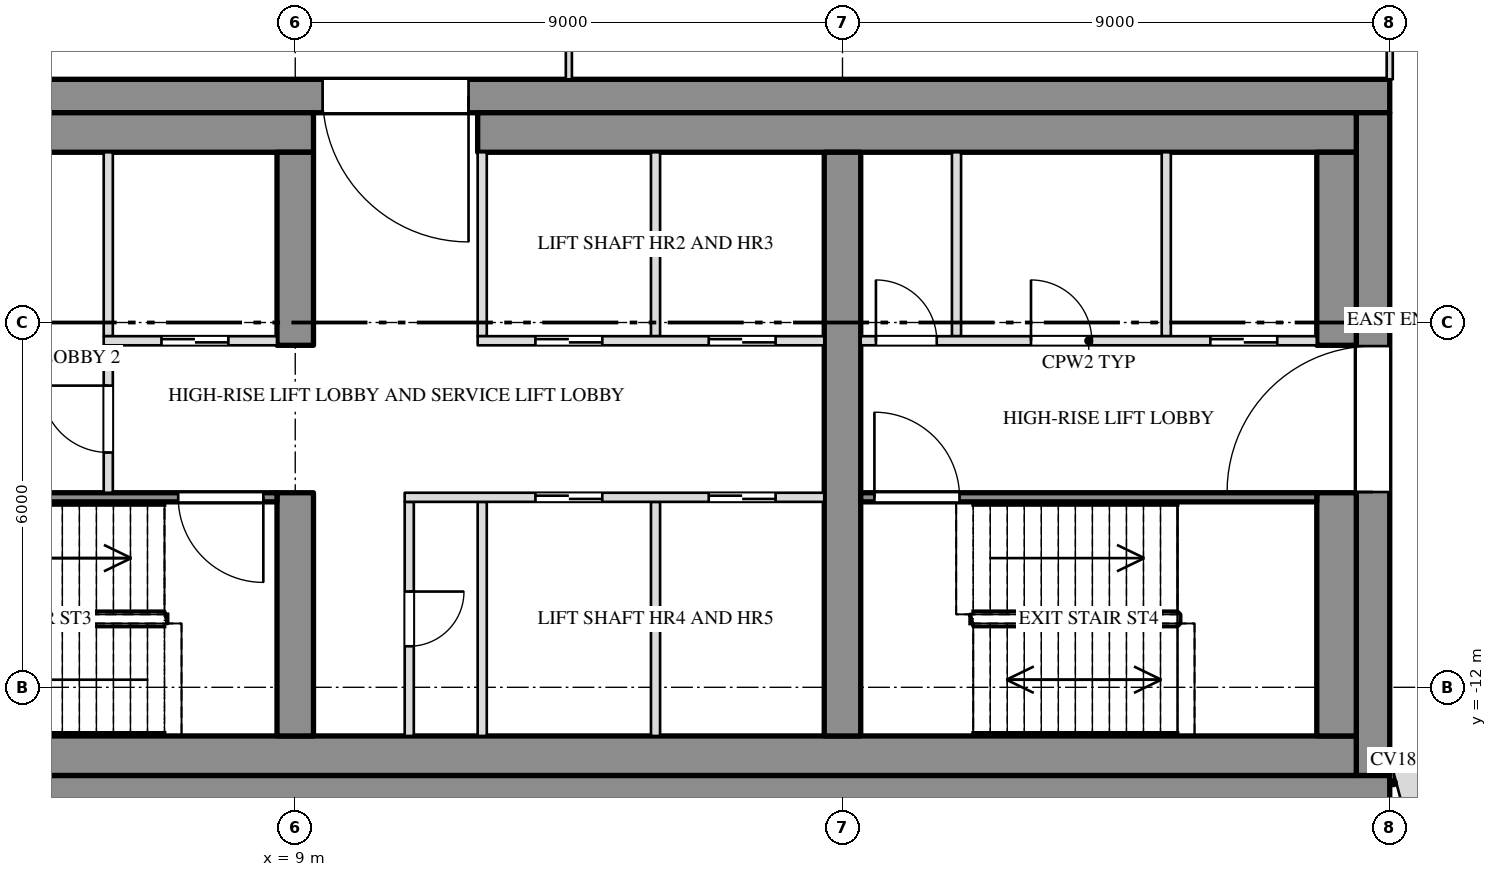
"""IFC4 building model, lengths in metres.
Left out: names, types, materials, properties, quantities, classifications, styles, units other than length and angle.
Written with IfcOpenShell. Run it as: python <this file> out.ifc"""

import sys

from ifc_helpers import new_model, si_unit, direction, frame, frame_2d, origin, place, context, subcontext, project, spatial, rectangle, extrude, element, fill, save


model = new_model("IFC4")
c1 = context("Model", 3, precision=1e-05, world=origin(), true_north=direction((0.0, 1.0)))
c2 = subcontext(c1, "Body", "Model", "MODEL_VIEW")
j1 = project(units=[si_unit("LENGTHUNIT", "METRE"), si_unit("PLANEANGLEUNIT", "RADIAN")], contexts=[c1])
p1 = place(None, origin())
s1 = spatial("IfcSite", under=j1, at=p1, CompositionType="ELEMENT")
p2 = place(p1, origin())
s2 = spatial("IfcBuilding", under=s1, at=p2, CompositionType="ELEMENT")
p3 = place(p2, frame((0.0, 0.0, 292.5)))
s3 = spatial("IfcBuildingStorey", under=s2, at=p3, CompositionType="ELEMENT", Elevation=292.5)
p4 = place(p3, frame((-27.0, -2.275, 0.0), z_axis=(0.0, 0.0, 1.0), x_axis=(1.0, 0.0, 0.0)))
e1 = element("IfcWall", 1, at=p4, inside=s3, PredefinedType="SHEAR", context=c2, shape_type="SweptSolid", body=[
    extrude(rectangle(XDim=54.0, YDim=0.55, at=frame_2d((27.0, 0.0))), origin(), (0.0, 0.0, 1.0), 3.6),
])
p5 = place(p4, frame((15.15, 0.0, 0.0)))
e2 = element("IfcOpeningElement", 2, at=p5, cuts=e1, PredefinedType="OPENING", context=c2, shape_type="SweptSolid", body=[
    extrude(rectangle(XDim=2.4, YDim=2.1, at=frame_2d((1.2, 1.05))), frame((0.0, 0.287, 0.0), z_axis=(0.0, -1.0, 0.0), x_axis=(1.0, 0.0, 0.0)), (0.0, 0.0, 1.0), 0.574),
])
p6 = place(p4, frame((36.45, 0.0, 0.0)))
e3 = element("IfcOpeningElement", 3, at=p6, cuts=e1, PredefinedType="OPENING", context=c2, shape_type="SweptSolid", body=[
    extrude(rectangle(XDim=2.4, YDim=2.1, at=frame_2d((1.2, 1.05))), frame((0.0, 0.287, 0.0), z_axis=(0.0, -1.0, 0.0), x_axis=(1.0, 0.0, 0.0)), (0.0, 0.0, 1.0), 0.574),
])
p7 = place(p3, frame((-27.0, -13.725, 0.0), z_axis=(0.0, 0.0, 1.0), x_axis=(1.0, 0.0, 0.0)))
e4 = element("IfcWall", 4, at=p7, inside=s3, PredefinedType="SHEAR", context=c2, shape_type="SweptSolid", body=[
    extrude(rectangle(XDim=54.0, YDim=0.55, at=frame_2d((27.0, 0.0))), origin(), (0.0, 0.0, 1.0), 3.6),
])
p8 = place(p3, frame((26.725, -13.45, 0.0), z_axis=(0.0, 0.0, 1.0), x_axis=(0.0, 1.0, 0.0)))
e5 = element("IfcWall", 5, at=p8, inside=s3, PredefinedType="SHEAR", context=c2, shape_type="SweptSolid", body=[
    extrude(rectangle(XDim=10.9, YDim=0.55, at=frame_2d((5.45, 0.0))), origin(), (0.0, 0.0, 1.0), 3.6),
])
p9 = place(p8, frame((4.662, 0.0, 0.0)))
e6 = element("IfcOpeningElement", 6, at=p9, cuts=e5, PredefinedType="OPENING", context=c2, shape_type="SweptSolid", body=[
    extrude(rectangle(XDim=2.4, YDim=2.1, at=frame_2d((1.2, 1.05))), frame((0.0, 0.287, 0.0), z_axis=(0.0, -1.0, 0.0), x_axis=(1.0, 0.0, 0.0)), (0.0, 0.0, 1.0), 0.574),
])
p10 = place(p3, frame((-9.3, -2.875, 0.0), z_axis=(0.0, 0.0, 1.0), x_axis=(1.0, 0.0, 0.0)))
e7 = element("IfcWall", 7, at=p10, inside=s3, PredefinedType="SHEAR", context=c2, shape_type="SweptSolid", body=[
    extrude(rectangle(XDim=18.6, YDim=0.65, at=frame_2d((9.3, 0.0))), origin(), (0.0, 0.0, 1.0), 3.6),
])
p11 = place(p3, frame((12.0, -2.875, 0.0), z_axis=(0.0, 0.0, 1.0), x_axis=(1.0, 0.0, 0.0)))
e8 = element("IfcWall", 8, at=p11, inside=s3, PredefinedType="SHEAR", context=c2, shape_type="SweptSolid", body=[
    extrude(rectangle(XDim=14.45, YDim=0.65, at=frame_2d((7.225, 0.0))), origin(), (0.0, 0.0, 1.0), 3.6),
])
p12 = place(p3, frame((-26.45, -13.125, 0.0), z_axis=(0.0, 0.0, 1.0), x_axis=(1.0, 0.0, 0.0)))
e9 = element("IfcWall", 9, at=p12, inside=s3, PredefinedType="SHEAR", context=c2, shape_type="SweptSolid", body=[
    extrude(rectangle(XDim=52.9, YDim=0.65, at=frame_2d((26.45, 0.0))), origin(), (0.0, 0.0, 1.0), 3.6),
])
p13 = place(p3, frame((26.125, -12.8, 0.0), z_axis=(0.0, 0.0, 1.0), x_axis=(0.0, 1.0, 0.0)))
e10 = element("IfcWall", 10, at=p13, inside=s3, PredefinedType="SHEAR", context=c2, shape_type="SweptSolid", body=[
    extrude(rectangle(XDim=4.0, YDim=0.65, at=frame_2d((2.0, 0.0))), origin(), (0.0, 0.0, 1.0), 3.6),
])
p14 = place(p3, frame((26.125, -6.375, 0.0), z_axis=(0.0, 0.0, 1.0), x_axis=(0.0, 1.0, 0.0)))
e11 = element("IfcWall", 11, at=p14, inside=s3, PredefinedType="SHEAR", context=c2, shape_type="SweptSolid", body=[
    extrude(rectangle(XDim=3.175, YDim=0.65, at=frame_2d((1.587, 0.0))), origin(), (0.0, 0.0, 1.0), 3.6),
])
p15 = place(p3, frame((9.0, -12.8, 0.0), z_axis=(0.0, 0.0, 1.0), x_axis=(0.0, 1.0, 0.0)))
e12 = element("IfcWall", 12, at=p15, inside=s3, PredefinedType="SHEAR", context=c2, shape_type="SweptSolid", body=[
    extrude(rectangle(XDim=4.0, YDim=0.6, at=frame_2d((2.0, 0.0))), origin(), (0.0, 0.0, 1.0), 3.6),
])
p16 = place(p3, frame((9.0, -6.375, 0.0), z_axis=(0.0, 0.0, 1.0), x_axis=(0.0, 1.0, 0.0)))
e13 = element("IfcWall", 13, at=p16, inside=s3, PredefinedType="SHEAR", context=c2, shape_type="SweptSolid", body=[
    extrude(rectangle(XDim=3.175, YDim=0.6, at=frame_2d((1.587, 0.0))), origin(), (0.0, 0.0, 1.0), 3.6),
])
p17 = place(p3, frame((18.0, -12.8, 0.0), z_axis=(0.0, 0.0, 1.0), x_axis=(0.0, 1.0, 0.0)))
e14 = element("IfcWall", 14, at=p17, inside=s3, PredefinedType="SHEAR", context=c2, shape_type="SweptSolid", body=[
    extrude(rectangle(XDim=9.6, YDim=0.6, at=frame_2d((4.8, 0.0))), origin(), (0.0, 0.0, 1.0), 3.6),
])
p18 = place(p3, frame((13.5, -2.0, 0.0), z_axis=(0.0, 0.0, 1.0), x_axis=(0.0, 1.0, 0.0)))
e15 = element("IfcWall", 15, at=p18, inside=s3, PredefinedType="PARTITIONING", context=c2, shape_type="SweptSolid", body=[
    extrude(rectangle(XDim=9.63, YDim=0.1, at=frame_2d((4.815, 0.0))), origin(), (0.0, 0.0, 1.0), 2.988),
])
p19 = place(p3, frame((27.0, -2.0, 0.0), z_axis=(0.0, 0.0, 1.0), x_axis=(0.0, 1.0, 0.0)))
e16 = element("IfcWall", 16, at=p19, inside=s3, PredefinedType="PARTITIONING", context=c2, shape_type="SweptSolid", body=[
    extrude(rectangle(XDim=6.323, YDim=0.1, at=frame_2d((3.162, 0.0))), origin(), (0.0, 0.0, 1.0), 2.668),
])
p20 = place(p3, frame((27.104, -13.558, 0.0), z_axis=(0.0, 0.0, 1.0), x_axis=(0.965913121497, 0.258866455379, 0.0)))
e17 = element("IfcWall", 17, at=p20, inside=s3, PredefinedType="SOLIDWALL", context=c2, shape_type="SweptSolid", body=[
    extrude(rectangle(XDim=1.123, YDim=0.8, at=frame_2d((0.562, 0.0))), origin(), (0.0, 0.0, 1.0), 3.6),
])
for number, where, z_axis, x_axis in (
    (18, (5.925, -6.225, 0.0), (0.0, 0.0, 1.0), (0.0, 1.0, 0.0)),
    (19, (12.075, -6.225, 0.0), (0.0, 0.0, 1.0), (0.0, 1.0, 0.0)),
    (20, (14.925, -6.225, 0.0), (0.0, 0.0, 1.0), (0.0, 1.0, 0.0)),
    (21, (19.875, -6.225, 0.0), (0.0, 0.0, 1.0), (0.0, 1.0, 0.0)),
    (22, (23.325, -6.225, 0.0), (0.0, 0.0, 1.0), (0.0, 1.0, 0.0)),
):
    element("IfcWall", number, at=place(p3, frame(where, z_axis=z_axis, x_axis=x_axis)), inside=s3, PredefinedType="PARTITIONING", context=c2, shape_type="SweptSolid", body=[
        extrude(rectangle(XDim=3.025, YDim=0.15, at=frame_2d((1.513, 0.0))), origin(), (0.0, 0.0, 1.0), 3.6),
    ])
p21 = place(p3, frame((10.875, -12.8, 0.0), z_axis=(0.0, 0.0, 1.0), x_axis=(0.0, 1.0, 0.0)))
e23 = element("IfcWall", 23, at=p21, inside=s3, PredefinedType="PARTITIONING", context=c2, shape_type="SweptSolid", body=[
    extrude(rectangle(XDim=3.85, YDim=0.15, at=frame_2d((1.925, 0.0))), origin(), (0.0, 0.0, 1.0), 3.6),
])
p22 = place(p21, frame((1.475, 0.0, 0.0)))
e24 = element("IfcOpeningElement", 24, at=p22, cuts=e23, PredefinedType="OPENING", context=c2, shape_type="SweptSolid", body=[
    extrude(rectangle(XDim=0.9, YDim=2.1, at=frame_2d((0.45, 1.05))), frame((0.0, 0.087, 0.0), z_axis=(0.0, -1.0, 0.0), x_axis=(1.0, 0.0, 0.0)), (0.0, 0.0, 1.0), 0.174),
])
for number, where, z_axis, x_axis in (
    (25, (12.075, -12.8, 0.0), (0.0, 0.0, 1.0), (0.0, 1.0, 0.0)),
    (26, (14.925, -12.8, 0.0), (0.0, 0.0, 1.0), (0.0, 1.0, 0.0)),
):
    element("IfcWall", number, at=place(p3, frame(where, z_axis=z_axis, x_axis=x_axis)), inside=s3, PredefinedType="PARTITIONING", context=c2, shape_type="SweptSolid", body=[
        extrude(rectangle(XDim=3.85, YDim=0.15, at=frame_2d((1.925, 0.0))), origin(), (0.0, 0.0, 1.0), 3.6),
    ])
p23 = place(p3, frame((5.925, -8.8, 0.0), z_axis=(0.0, 0.0, 1.0), x_axis=(0.0, 1.0, 0.0)))
e27 = element("IfcWall", 27, at=p23, inside=s3, PredefinedType="PARTITIONING", context=c2, shape_type="SweptSolid", body=[
    extrude(rectangle(XDim=2.425, YDim=0.15, at=frame_2d((1.212, 0.0))), origin(), (0.0, 0.0, 1.0), 3.6),
])
p24 = place(p23, frame((0.662, 0.0, 0.0)))
e28 = element("IfcOpeningElement", 28, at=p24, cuts=e27, PredefinedType="OPENING", context=c2, shape_type="SweptSolid", body=[
    extrude(rectangle(XDim=1.1, YDim=2.1, at=frame_2d((0.55, 1.05))), frame((0.0, 0.087, 0.0), z_axis=(0.0, -1.0, 0.0), x_axis=(1.0, 0.0, 0.0)), (0.0, 0.0, 1.0), 0.174),
])
p25 = place(p3, frame((5.85, -6.3, 0.0), z_axis=(0.0, 0.0, 1.0), x_axis=(1.0, 0.0, 0.0)))
e29 = element("IfcWall", 29, at=p25, inside=s3, PredefinedType="PARTITIONING", context=c2, shape_type="SweptSolid", body=[
    extrude(rectangle(XDim=2.85, YDim=0.15, at=frame_2d((1.425, 0.0))), origin(), (0.0, 0.0, 1.0), 3.6),
])
p26 = place(p25, frame((0.95, 0.0, 0.0)))
e30 = element("IfcOpeningElement", 30, at=p26, cuts=e29, PredefinedType="OPENING", context=c2, shape_type="SweptSolid", body=[
    extrude(rectangle(XDim=1.1, YDim=2.1, at=frame_2d((0.55, 1.05))), frame((0.0, 0.087, 0.0), z_axis=(0.0, -1.0, 0.0), x_axis=(1.0, 0.0, 0.0)), (0.0, 0.0, 1.0), 0.174),
])
p27 = place(p3, frame((12.0, -6.3, 0.0), z_axis=(0.0, 0.0, 1.0), x_axis=(1.0, 0.0, 0.0)))
e31 = element("IfcWall", 31, at=p27, inside=s3, PredefinedType="PARTITIONING", context=c2, shape_type="SweptSolid", body=[
    extrude(rectangle(XDim=5.7, YDim=0.15, at=frame_2d((2.85, 0.0))), origin(), (0.0, 0.0, 1.0), 3.6),
])
p28 = place(p27, frame((0.95, 0.0, 0.0)))
e32 = element("IfcOpeningElement", 32, at=p28, cuts=e31, PredefinedType="OPENING", context=c2, shape_type="SweptSolid", body=[
    extrude(rectangle(XDim=1.1, YDim=2.1, at=frame_2d((0.55, 1.05))), frame((0.0, 0.087, 0.0), z_axis=(0.0, -1.0, 0.0), x_axis=(1.0, 0.0, 0.0)), (0.0, 0.0, 1.0), 0.174),
])
p29 = place(p27, frame((3.8, 0.0, 0.0)))
e33 = element("IfcOpeningElement", 33, at=p29, cuts=e31, PredefinedType="OPENING", context=c2, shape_type="SweptSolid", body=[
    extrude(rectangle(XDim=1.1, YDim=2.1, at=frame_2d((0.55, 1.05))), frame((0.0, 0.087, 0.0), z_axis=(0.0, -1.0, 0.0), x_axis=(1.0, 0.0, 0.0)), (0.0, 0.0, 1.0), 0.174),
])
p30 = place(p3, frame((18.3, -6.3, 0.0), z_axis=(0.0, 0.0, 1.0), x_axis=(1.0, 0.0, 0.0)))
e34 = element("IfcWall", 34, at=p30, inside=s3, PredefinedType="PARTITIONING", context=c2, shape_type="SweptSolid", body=[
    extrude(rectangle(XDim=7.5, YDim=0.15, at=frame_2d((3.75, 0.0))), origin(), (0.0, 0.0, 1.0), 3.6),
])
p31 = place(p30, frame((0.25, 0.0, 0.0)))
e35 = element("IfcOpeningElement", 35, at=p31, cuts=e34, PredefinedType="OPENING", context=c2, shape_type="SweptSolid", body=[
    extrude(rectangle(XDim=1.0, YDim=2.1, at=frame_2d((0.5, 1.05))), frame((0.0, 0.087, 0.0), z_axis=(0.0, -1.0, 0.0), x_axis=(1.0, 0.0, 0.0)), (0.0, 0.0, 1.0), 0.174),
])
p32 = place(p30, frame((2.8, 0.0, 0.0)))
e36 = element("IfcOpeningElement", 36, at=p32, cuts=e34, PredefinedType="OPENING", context=c2, shape_type="SweptSolid", body=[
    extrude(rectangle(XDim=1.0, YDim=2.1, at=frame_2d((0.5, 1.05))), frame((0.0, 0.087, 0.0), z_axis=(0.0, -1.0, 0.0), x_axis=(1.0, 0.0, 0.0)), (0.0, 0.0, 1.0), 0.174),
])
p33 = place(p30, frame((5.75, 0.0, 0.0)))
e37 = element("IfcOpeningElement", 37, at=p33, cuts=e34, PredefinedType="OPENING", context=c2, shape_type="SweptSolid", body=[
    extrude(rectangle(XDim=1.1, YDim=2.1, at=frame_2d((0.55, 1.05))), frame((0.0, 0.087, 0.0), z_axis=(0.0, -1.0, 0.0), x_axis=(1.0, 0.0, 0.0)), (0.0, 0.0, 1.0), 0.174),
])
p34 = place(p3, frame((0.3, -8.875, 0.0), z_axis=(0.0, 0.0, 1.0), x_axis=(1.0, 0.0, 0.0)))
e38 = element("IfcWall", 38, at=p34, inside=s3, PredefinedType="SHEAR", context=c2, shape_type="SweptSolid", body=[
    extrude(rectangle(XDim=8.4, YDim=0.15, at=frame_2d((4.2, 0.0))), origin(), (0.0, 0.0, 1.0), 3.6),
])
p35 = place(p34, frame((6.775, 0.0, 0.0)))
e39 = element("IfcOpeningElement", 39, at=p35, cuts=e38, PredefinedType="OPENING", context=c2, shape_type="SweptSolid", body=[
    extrude(rectangle(XDim=1.4, YDim=2.1, at=frame_2d((0.7, 1.05))), frame((0.0, 0.087, 0.0), z_axis=(0.0, -1.0, 0.0), x_axis=(1.0, 0.0, 0.0)), (0.0, 0.0, 1.0), 0.174),
])
p36 = place(p3, frame((10.8, -8.875, 0.0), z_axis=(0.0, 0.0, 1.0), x_axis=(1.0, 0.0, 0.0)))
e40 = element("IfcWall", 40, at=p36, inside=s3, PredefinedType="PARTITIONING", context=c2, shape_type="SweptSolid", body=[
    extrude(rectangle(XDim=6.9, YDim=0.15, at=frame_2d((3.45, 0.0))), origin(), (0.0, 0.0, 1.0), 3.6),
])
p37 = place(p36, frame((2.15, 0.0, 0.0)))
e41 = element("IfcOpeningElement", 41, at=p37, cuts=e40, PredefinedType="OPENING", context=c2, shape_type="SweptSolid", body=[
    extrude(rectangle(XDim=1.1, YDim=2.1, at=frame_2d((0.55, 1.05))), frame((0.0, 0.087, 0.0), z_axis=(0.0, -1.0, 0.0), x_axis=(1.0, 0.0, 0.0)), (0.0, 0.0, 1.0), 0.174),
])
p38 = place(p36, frame((5.0, 0.0, 0.0)))
e42 = element("IfcOpeningElement", 42, at=p38, cuts=e40, PredefinedType="OPENING", context=c2, shape_type="SweptSolid", body=[
    extrude(rectangle(XDim=1.1, YDim=2.1, at=frame_2d((0.55, 1.05))), frame((0.0, 0.087, 0.0), z_axis=(0.0, -1.0, 0.0), x_axis=(1.0, 0.0, 0.0)), (0.0, 0.0, 1.0), 0.174),
])
p39 = place(p3, frame((18.3, -8.875, 0.0), z_axis=(0.0, 0.0, 1.0), x_axis=(1.0, 0.0, 0.0)))
e43 = element("IfcWall", 43, at=p39, inside=s3, PredefinedType="SHEAR", context=c2, shape_type="SweptSolid", body=[
    extrude(rectangle(XDim=7.5, YDim=0.15, at=frame_2d((3.75, 0.0))), origin(), (0.0, 0.0, 1.0), 3.6),
])
p40 = place(p39, frame((0.225, 0.0, 0.0)))
e44 = element("IfcOpeningElement", 44, at=p40, cuts=e43, PredefinedType="OPENING", context=c2, shape_type="SweptSolid", body=[
    extrude(rectangle(XDim=1.4, YDim=2.1, at=frame_2d((0.7, 1.05))), frame((0.0, 0.087, 0.0), z_axis=(0.0, -1.0, 0.0), x_axis=(1.0, 0.0, 0.0)), (0.0, 0.0, 1.0), 0.174),
])
p41 = place(p24, origin())
e45 = element("IfcDoor", 45, at=p41, inside=s3, OperationType="SINGLE_SWING_RIGHT", PredefinedType="DOOR", context=c2, shape_type="SweptSolid", body=[
    extrude(rectangle(XDim=1.1, YDim=2.1, at=frame_2d((0.55, 1.05))), frame((0.0, 0.025, 0.0), z_axis=(0.0, -1.0, 0.0), x_axis=(1.0, 0.0, 0.0)), (0.0, 0.0, 1.0), 0.05),
])
fill(e28, e45)
p42 = place(p26, origin())
e46 = element("IfcDoor", 46, at=p42, inside=s3, OperationType="SLIDING_TO_RIGHT", PredefinedType="DOOR", context=c2, shape_type="SweptSolid", body=[
    extrude(rectangle(XDim=1.1, YDim=2.1, at=frame_2d((0.55, 1.05))), frame((0.0, 0.025, 0.0), z_axis=(0.0, -1.0, 0.0), x_axis=(1.0, 0.0, 0.0)), (0.0, 0.0, 1.0), 0.05),
])
fill(e30, e46)
p43 = place(p35, origin())
e47 = element("IfcDoor", 47, at=p43, inside=s3, OperationType="DOUBLE_DOOR_SINGLE_SWING", PredefinedType="DOOR", context=c2, shape_type="SweptSolid", body=[
    extrude(rectangle(XDim=1.4, YDim=2.1, at=frame_2d((0.7, 1.05))), frame((0.0, 0.025, 0.0), z_axis=(0.0, -1.0, 0.0), x_axis=(1.0, 0.0, 0.0)), (0.0, 0.0, 1.0), 0.05),
])
fill(e39, e47)
p44 = place(p6, origin())
e48 = element("IfcDoor", 48, at=p44, inside=s3, OperationType="DOUBLE_DOOR_SINGLE_SWING", PredefinedType="DOOR", context=c2, shape_type="SweptSolid", body=[
    extrude(rectangle(XDim=2.4, YDim=2.1, at=frame_2d((1.2, 1.05))), frame((0.0, 0.025, 0.0), z_axis=(0.0, -1.0, 0.0), x_axis=(1.0, 0.0, 0.0)), (0.0, 0.0, 1.0), 0.05),
])
fill(e3, e48)
p45 = place(p22, origin())
e49 = element("IfcDoor", 49, at=p45, inside=s3, OperationType="SINGLE_SWING_LEFT", PredefinedType="DOOR", context=c2, shape_type="SweptSolid", body=[
    extrude(rectangle(XDim=0.9, YDim=2.1, at=frame_2d((0.45, 1.05))), frame((0.0, 0.025, 0.0), z_axis=(0.0, -1.0, 0.0), x_axis=(1.0, 0.0, 0.0)), (0.0, 0.0, 1.0), 0.05),
])
fill(e24, e49)
p46 = place(p37, origin())
e50 = element("IfcDoor", 50, at=p46, inside=s3, OperationType="SLIDING_TO_RIGHT", PredefinedType="DOOR", context=c2, shape_type="SweptSolid", body=[
    extrude(rectangle(XDim=1.1, YDim=2.1, at=frame_2d((0.55, 1.05))), frame((0.0, 0.025, 0.0), z_axis=(0.0, -1.0, 0.0), x_axis=(1.0, 0.0, 0.0)), (0.0, 0.0, 1.0), 0.05),
])
fill(e41, e50)
p47 = place(p28, origin())
e51 = element("IfcDoor", 51, at=p47, inside=s3, OperationType="SLIDING_TO_LEFT", PredefinedType="DOOR", context=c2, shape_type="SweptSolid", body=[
    extrude(rectangle(XDim=1.1, YDim=2.1, at=frame_2d((0.55, 1.05))), frame((0.0, 0.025, 0.0), z_axis=(0.0, -1.0, 0.0), x_axis=(1.0, 0.0, 0.0)), (0.0, 0.0, 1.0), 0.05),
])
fill(e32, e51)
p48 = place(p38, origin())
e52 = element("IfcDoor", 52, at=p48, inside=s3, OperationType="SLIDING_TO_RIGHT", PredefinedType="DOOR", context=c2, shape_type="SweptSolid", body=[
    extrude(rectangle(XDim=1.1, YDim=2.1, at=frame_2d((0.55, 1.05))), frame((0.0, 0.025, 0.0), z_axis=(0.0, -1.0, 0.0), x_axis=(1.0, 0.0, 0.0)), (0.0, 0.0, 1.0), 0.05),
])
fill(e42, e52)
p49 = place(p29, origin())
e53 = element("IfcDoor", 53, at=p49, inside=s3, OperationType="SLIDING_TO_LEFT", PredefinedType="DOOR", context=c2, shape_type="SweptSolid", body=[
    extrude(rectangle(XDim=1.1, YDim=2.1, at=frame_2d((0.55, 1.05))), frame((0.0, 0.025, 0.0), z_axis=(0.0, -1.0, 0.0), x_axis=(1.0, 0.0, 0.0)), (0.0, 0.0, 1.0), 0.05),
])
fill(e33, e53)
p50 = place(p31, origin())
e54 = element("IfcDoor", 54, at=p50, inside=s3, OperationType="SINGLE_SWING_LEFT", PredefinedType="DOOR", context=c2, shape_type="SweptSolid", body=[
    extrude(rectangle(XDim=1.0, YDim=2.1, at=frame_2d((0.5, 1.05))), frame((0.0, 0.025, 0.0), z_axis=(0.0, -1.0, 0.0), x_axis=(1.0, 0.0, 0.0)), (0.0, 0.0, 1.0), 0.05),
])
fill(e35, e54)
p51 = place(p40, origin())
e55 = element("IfcDoor", 55, at=p51, inside=s3, OperationType="DOUBLE_DOOR_SINGLE_SWING", PredefinedType="DOOR", context=c2, shape_type="SweptSolid", body=[
    extrude(rectangle(XDim=1.4, YDim=2.1, at=frame_2d((0.7, 1.05))), frame((0.0, 0.025, 0.0), z_axis=(0.0, -1.0, 0.0), x_axis=(1.0, 0.0, 0.0)), (0.0, 0.0, 1.0), 0.05),
])
fill(e44, e55)
p52 = place(p32, origin())
e56 = element("IfcDoor", 56, at=p52, inside=s3, OperationType="SINGLE_SWING_LEFT", PredefinedType="DOOR", context=c2, shape_type="SweptSolid", body=[
    extrude(rectangle(XDim=1.0, YDim=2.1, at=frame_2d((0.5, 1.05))), frame((0.0, 0.025, 0.0), z_axis=(0.0, -1.0, 0.0), x_axis=(1.0, 0.0, 0.0)), (0.0, 0.0, 1.0), 0.05),
])
fill(e36, e56)
p53 = place(p33, origin())
e57 = element("IfcDoor", 57, at=p53, inside=s3, OperationType="SLIDING_TO_LEFT", PredefinedType="DOOR", context=c2, shape_type="SweptSolid", body=[
    extrude(rectangle(XDim=1.1, YDim=2.1, at=frame_2d((0.55, 1.05))), frame((0.0, 0.025, 0.0), z_axis=(0.0, -1.0, 0.0), x_axis=(1.0, 0.0, 0.0)), (0.0, 0.0, 1.0), 0.05),
])
fill(e37, e57)
p54 = place(p9, origin())
e58 = element("IfcDoor", 58, at=p54, inside=s3, OperationType="DOUBLE_DOOR_SINGLE_SWING", PredefinedType="DOOR", context=c2, shape_type="SweptSolid", body=[
    extrude(rectangle(XDim=2.4, YDim=2.1, at=frame_2d((1.2, 1.05))), frame((0.0, 0.025, 0.0), z_axis=(0.0, -1.0, 0.0), x_axis=(1.0, 0.0, 0.0)), (0.0, 0.0, 1.0), 0.05),
])
fill(e6, e58)
save(model, sys.argv[1])
